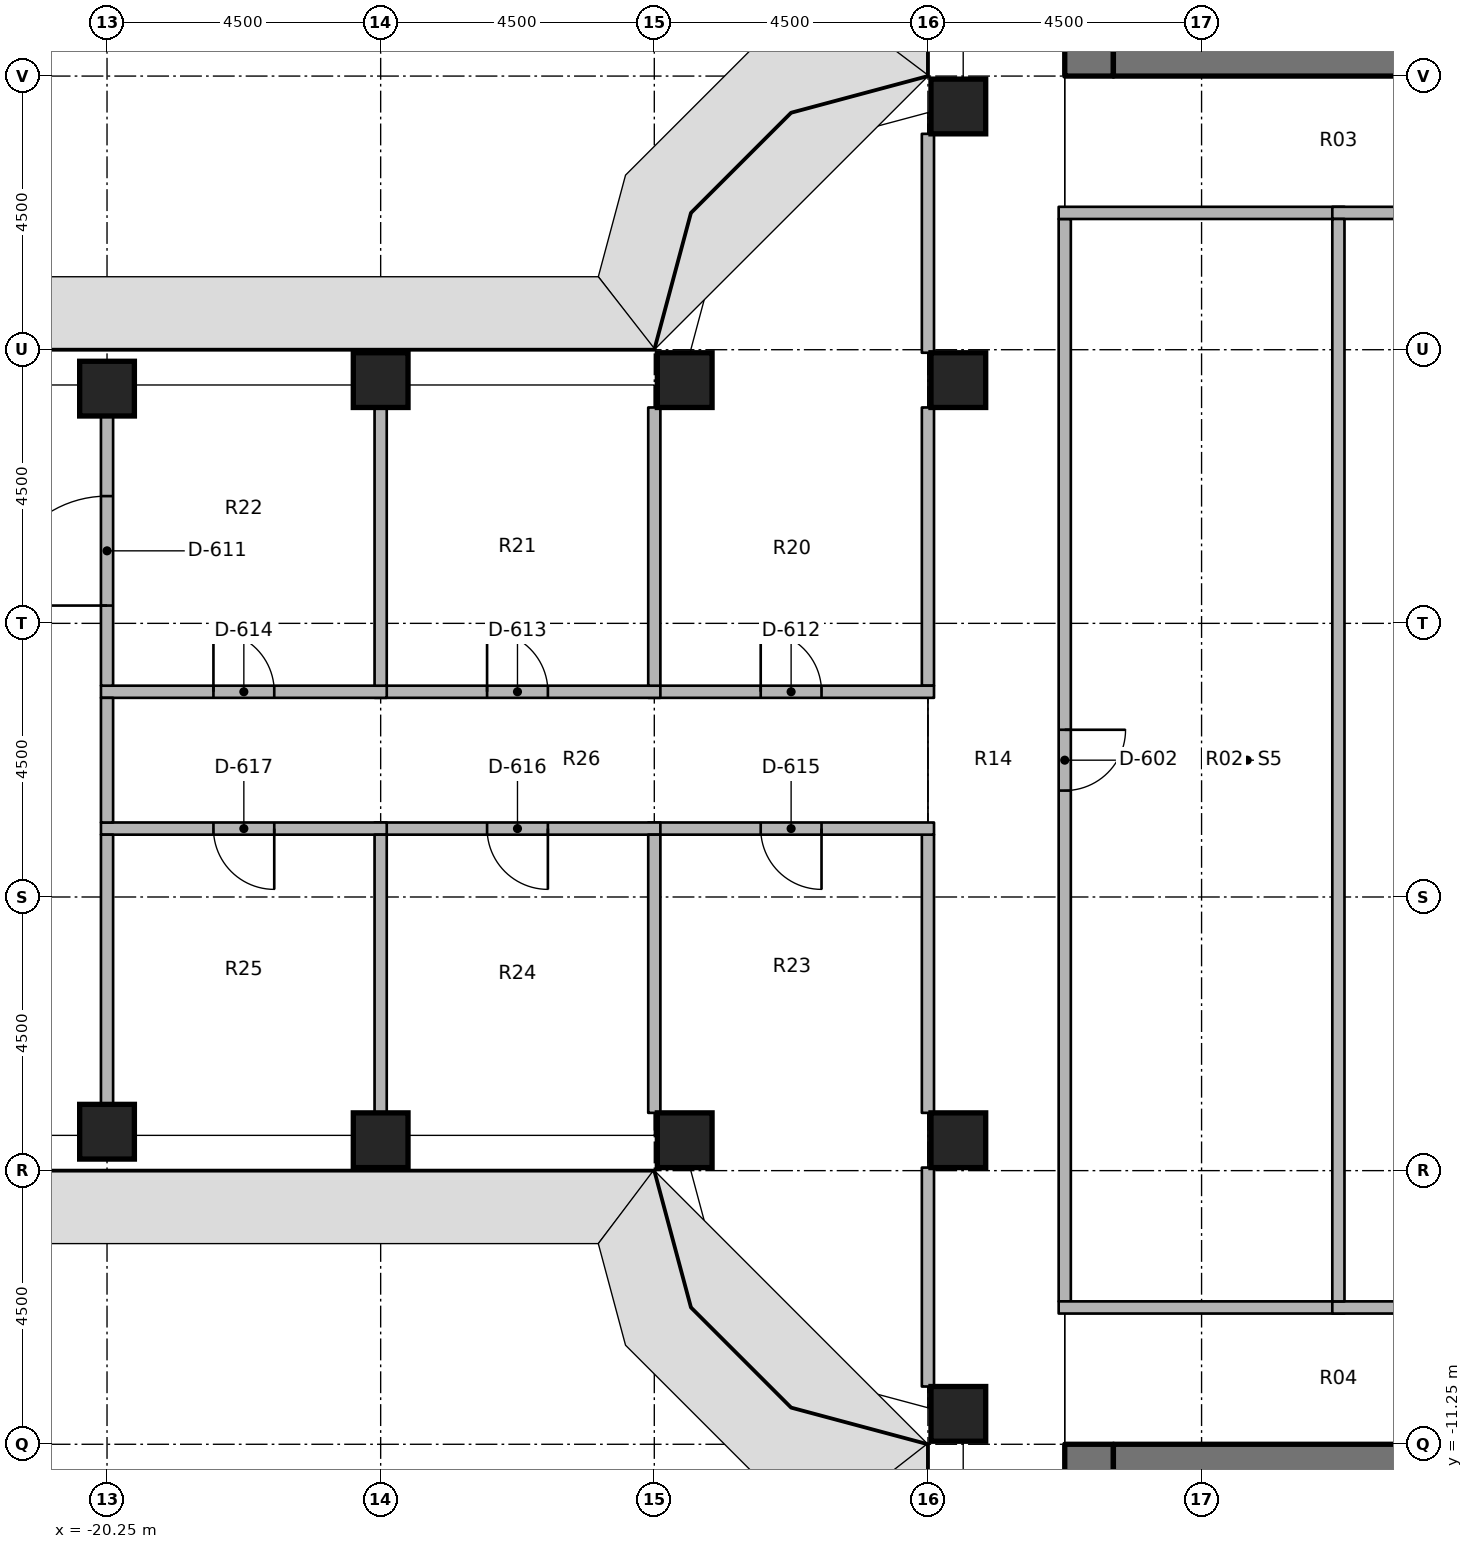
"""IFC4 building model, lengths in metres.
Left out: names, types, materials, properties, quantities, classifications, styles, units other than length and angle.
Written with IfcOpenShell. Run it as: python <this file> out.ifc"""

import sys

from ifc_helpers import new_model, si_unit, direction, frame, frame_2d, origin, origin_2d, place, context, subcontext, project, spatial, rectangle, extrude, element, fill, save


model = new_model("IFC4")
c1 = context("Model", 3, precision=1e-05, world=origin(), true_north=direction((0.0, 1.0)))
c2 = subcontext(c1, "Body", "Model", "MODEL_VIEW")
j1 = project(units=[si_unit("LENGTHUNIT", "METRE"), si_unit("PLANEANGLEUNIT", "RADIAN")], contexts=[c1])
p1 = place(None, origin())
s1 = spatial("IfcSite", under=j1, at=p1, CompositionType="ELEMENT")
p2 = place(p1, origin())
s2 = spatial("IfcBuilding", under=s1, at=p2, CompositionType="ELEMENT")
p3 = place(p2, frame((0.0, 0.0, 86.6)))
s3 = spatial("IfcBuildingStorey", under=s2, at=p3, CompositionType="ELEMENT", Elevation=86.6)
for number, where, z_axis, x_axis in (
    (1, (-20.25, -6.11, 0.0), (0.0, 0.0, 1.0), (1.0, 0.0, 0.0)),
    (2, (-20.25, 6.11, 0.0), (0.0, 0.0, 1.0), (1.0, 0.0, 0.0)),
    (3, (-15.75, -6.25, 0.0), (0.0, 0.0, 1.0), (1.0, 0.0, 0.0)),
    (4, (-15.75, 6.25, 0.0), (0.0, 0.0, 1.0), (1.0, 0.0, 0.0)),
    (5, (-10.75, -6.25, 0.0), (0.0, 0.0, 1.0), (1.0, 0.0, 0.0)),
    (6, (-10.75, 6.25, 0.0), (0.0, 0.0, 1.0), (1.0, 0.0, 0.0)),
    (7, (-6.25, -10.75, 0.0), (0.0, 0.0, 1.0), (1.0, 0.0, 0.0)),
    (8, (-6.25, -6.25, 0.0), (0.0, 0.0, 1.0), (1.0, 0.0, 0.0)),
    (9, (-6.25, 6.25, 0.0), (0.0, 0.0, 1.0), (1.0, 0.0, 0.0)),
    (10, (-6.25, 10.75, 0.0), (0.0, 0.0, 1.0), (1.0, 0.0, 0.0)),
):
    element("IfcColumn", number, at=place(p3, frame(where, z_axis=z_axis, x_axis=x_axis)), inside=s3, PredefinedType="COLUMN", context=c2, shape_type="SweptSolid", body=[
        extrude(rectangle(XDim=0.9, YDim=0.9, at=origin_2d()), origin(), (0.0, 0.0, 1.0), 3.65),
    ])
p4 = place(p3, frame((-4.1, 11.25, 0.0), z_axis=(0.0, 0.0, 1.0), x_axis=(0.0, 1.0, 0.0)))
e11 = element("IfcWall", 11, at=p4, inside=s3, PredefinedType="SHEAR", context=c2, shape_type="SweptSolid", body=[
    extrude(rectangle(XDim=15.0, YDim=0.8, at=frame_2d((7.5, 0.0))), origin(), (0.0, 0.0, 1.0), 3.8),
])
p5 = place(p4, frame((7.15, 0.0, 0.0)))
e12 = element("IfcOpeningElement", 12, at=p5, cuts=e11, PredefinedType="OPENING", context=c2, shape_type="SweptSolid", body=[
    extrude(rectangle(XDim=1.5, YDim=2.3, at=frame_2d((0.75, 1.15))), frame((0.0, 0.41, 0.0), z_axis=(0.0, -1.0, 0.0), x_axis=(1.0, 0.0, 0.0)), (0.0, 0.0, 1.0), 0.82),
])
p6 = place(p4, frame((13.9, 0.0, 0.0)))
e13 = element("IfcOpeningElement", 13, at=p6, cuts=e11, PredefinedType="OPENING", context=c2, shape_type="SweptSolid", body=[
    extrude(rectangle(XDim=0.9, YDim=2.1, at=frame_2d((0.45, 1.05))), frame((0.0, 0.41, 0.0), z_axis=(0.0, -1.0, 0.0), x_axis=(1.0, 0.0, 0.0)), (0.0, 0.0, 1.0), 0.82),
])
p7 = place(p4, frame((1.15, 0.0, 0.0)))
e14 = element("IfcOpeningElement", 14, at=p7, cuts=e11, PredefinedType="OPENING", context=c2, shape_type="SweptSolid", body=[
    extrude(rectangle(XDim=1.2, YDim=2.1, at=frame_2d((0.6, 1.05))), frame((0.0, 0.41, 0.0), z_axis=(0.0, -1.0, 0.0), x_axis=(1.0, 0.0, 0.0)), (0.0, 0.0, 1.0), 0.82),
])
p8 = place(p3, frame((-3.7, 11.65, 0.0), z_axis=(0.0, 0.0, 1.0), x_axis=(1.0, 0.0, 0.0)))
e15 = element("IfcWall", 15, at=p8, inside=s3, PredefinedType="SHEAR", context=c2, shape_type="SweptSolid", body=[
    extrude(rectangle(XDim=7.4, YDim=0.8, at=frame_2d((3.7, 0.0))), origin(), (0.0, 0.0, 1.0), 3.8),
])
p9 = place(p3, frame((-4.1, -11.25, 0.0), z_axis=(0.0, 0.0, 1.0), x_axis=(0.0, -1.0, 0.0)))
e16 = element("IfcWall", 16, at=p9, inside=s3, PredefinedType="SHEAR", context=c2, shape_type="SweptSolid", body=[
    extrude(rectangle(XDim=15.0, YDim=0.8, at=frame_2d((7.5, 0.0))), origin(), (0.0, 0.0, 1.0), 3.8),
])
p10 = place(p9, frame((7.15, 0.0, 0.0)))
e17 = element("IfcOpeningElement", 17, at=p10, cuts=e16, PredefinedType="OPENING", context=c2, shape_type="SweptSolid", body=[
    extrude(rectangle(XDim=1.5, YDim=2.3, at=frame_2d((0.75, 1.15))), frame((0.0, 0.41, 0.0), z_axis=(0.0, -1.0, 0.0), x_axis=(1.0, 0.0, 0.0)), (0.0, 0.0, 1.0), 0.82),
])
p11 = place(p9, frame((5.55, 0.0, 0.0)))
e18 = element("IfcOpeningElement", 18, at=p11, cuts=e16, PredefinedType="OPENING", context=c2, shape_type="SweptSolid", body=[
    extrude(rectangle(XDim=1.2, YDim=2.1, at=frame_2d((0.6, 1.05))), frame((0.0, 0.41, 0.0), z_axis=(0.0, -1.0, 0.0), x_axis=(1.0, 0.0, 0.0)), (0.0, 0.0, 1.0), 0.82),
])
p12 = place(p3, frame((-3.7, -11.65, 0.0), z_axis=(0.0, 0.0, 1.0), x_axis=(1.0, 0.0, 0.0)))
e19 = element("IfcWall", 19, at=p12, inside=s3, PredefinedType="SHEAR", context=c2, shape_type="SweptSolid", body=[
    extrude(rectangle(XDim=7.4, YDim=0.8, at=frame_2d((3.7, 0.0))), origin(), (0.0, 0.0, 1.0), 3.8),
])
p13 = place(p3, frame((-4.5, 8.9, 0.0), z_axis=(0.0, 0.0, 1.0), x_axis=(0.0, -1.0, 0.0)))
e20 = element("IfcWall", 20, at=p13, inside=s3, PredefinedType="PARTITIONING", context=c2, shape_type="SweptSolid", body=[
    extrude(rectangle(XDim=17.8, YDim=0.2, at=frame_2d((8.9, 0.0))), origin(), (0.0, 0.0, 1.0), 2.738),
])
p14 = place(p13, frame((8.4, 0.0, 0.0)))
e21 = element("IfcOpeningElement", 21, at=p14, cuts=e20, PredefinedType="OPENING", context=c2, shape_type="SweptSolid", body=[
    extrude(rectangle(XDim=1.0, YDim=2.1, at=frame_2d((0.5, 1.05))), frame((0.0, 0.11, 0.0), z_axis=(0.0, -1.0, 0.0), x_axis=(1.0, 0.0, 0.0)), (0.0, 0.0, 1.0), 0.22),
])
p15 = place(p3, frame((-6.75, 1.225, 0.0), z_axis=(0.0, 0.0, 1.0), x_axis=(0.0, 1.0, 0.0)))
e22 = element("IfcWall", 22, at=p15, inside=s3, PredefinedType="PARTITIONING", context=c2, shape_type="SweptSolid", body=[
    extrude(rectangle(XDim=4.575, YDim=0.2, at=frame_2d((2.288, 0.0))), origin(), (0.0, 0.0, 1.0), 2.738),
])
for number, where, z_axis, x_axis in (
    (23, (-6.75, 6.7, 0.0), (0.0, 0.0, 1.0), (0.0, 1.0, 0.0)),
    (24, (-6.75, -10.3, 0.0), (0.0, 0.0, 1.0), (0.0, 1.0, 0.0)),
):
    element("IfcWall", number, at=place(p3, frame(where, z_axis=z_axis, x_axis=x_axis)), inside=s3, PredefinedType="PARTITIONING", context=c2, shape_type="SweptSolid", body=[
        extrude(rectangle(XDim=3.6, YDim=0.2, at=frame_2d((1.8, 0.0))), origin(), (0.0, 0.0, 1.0), 2.738),
    ])
p16 = place(p3, frame((-6.75, -5.8, 0.0), z_axis=(0.0, 0.0, 1.0), x_axis=(0.0, 1.0, 0.0)))
e25 = element("IfcWall", 25, at=p16, inside=s3, PredefinedType="PARTITIONING", context=c2, shape_type="SweptSolid", body=[
    extrude(rectangle(XDim=4.575, YDim=0.2, at=frame_2d((2.288, 0.0))), origin(), (0.0, 0.0, 1.0), 2.738),
])
for number, where, z_axis, x_axis in (
    (26, (-4.6, 9.0, 0.0), (0.0, 0.0, 1.0), (1.0, 0.0, 0.0)),
    (27, (-0.1, 9.0, 0.0), (0.0, 0.0, 1.0), (1.0, 0.0, 0.0)),
    (28, (-4.6, -9.0, 0.0), (0.0, 0.0, 1.0), (1.0, 0.0, 0.0)),
    (29, (-0.1, -9.0, 0.0), (0.0, 0.0, 1.0), (1.0, 0.0, 0.0)),
):
    element("IfcWall", number, at=place(p3, frame(where, z_axis=z_axis, x_axis=x_axis)), inside=s3, PredefinedType="PARTITIONING", context=c2, shape_type="SweptSolid", body=[
        extrude(rectangle(XDim=4.7, YDim=0.2, at=frame_2d((2.35, 0.0))), origin(), (0.0, 0.0, 1.0), 2.738),
    ])
p17 = place(p3, frame((0.0, -8.9, 0.0), z_axis=(0.0, 0.0, 1.0), x_axis=(0.0, 1.0, 0.0)))
e30 = element("IfcWall", 30, at=p17, inside=s3, PredefinedType="PARTITIONING", context=c2, shape_type="SweptSolid", body=[
    extrude(rectangle(XDim=17.8, YDim=0.2, at=frame_2d((8.9, 0.0))), origin(), (0.0, 0.0, 1.0), 2.738),
])
p18 = place(p3, frame((-11.35, 1.125, 0.0), z_axis=(0.0, 0.0, 1.0), x_axis=(1.0, 0.0, 0.0)))
e31 = element("IfcWall", 31, at=p18, inside=s3, PredefinedType="PARTITIONING", context=c2, shape_type="SweptSolid", body=[
    extrude(rectangle(XDim=4.7, YDim=0.2, at=frame_2d((2.35, 0.0))), origin(), (0.0, 0.0, 1.0), 2.738),
])
p19 = place(p18, frame((1.85, 0.0, 0.0)))
e32 = element("IfcOpeningElement", 32, at=p19, cuts=e31, PredefinedType="OPENING", context=c2, shape_type="SweptSolid", body=[
    extrude(rectangle(XDim=1.0, YDim=2.1, at=frame_2d((0.5, 1.05))), frame((0.0, 0.11, 0.0), z_axis=(0.0, -1.0, 0.0), x_axis=(1.0, 0.0, 0.0)), (0.0, 0.0, 1.0), 0.22),
])
p20 = place(p3, frame((-6.65, -1.125, 0.0), z_axis=(0.0, 0.0, 1.0), x_axis=(-1.0, 0.0, 0.0)))
e33 = element("IfcWall", 33, at=p20, inside=s3, PredefinedType="PARTITIONING", context=c2, shape_type="SweptSolid", body=[
    extrude(rectangle(XDim=4.7, YDim=0.2, at=frame_2d((2.35, 0.0))), origin(), (0.0, 0.0, 1.0), 2.738),
])
p21 = place(p20, frame((1.85, 0.0, 0.0)))
e34 = element("IfcOpeningElement", 34, at=p21, cuts=e33, PredefinedType="OPENING", context=c2, shape_type="SweptSolid", body=[
    extrude(rectangle(XDim=1.0, YDim=2.1, at=frame_2d((0.5, 1.05))), frame((0.0, 0.11, 0.0), z_axis=(0.0, -1.0, 0.0), x_axis=(1.0, 0.0, 0.0)), (0.0, 0.0, 1.0), 0.22),
])
p22 = place(p3, frame((-15.85, 1.125, 0.0), z_axis=(0.0, 0.0, 1.0), x_axis=(1.0, 0.0, 0.0)))
e35 = element("IfcWall", 35, at=p22, inside=s3, PredefinedType="PARTITIONING", context=c2, shape_type="SweptSolid", body=[
    extrude(rectangle(XDim=4.7, YDim=0.2, at=frame_2d((2.35, 0.0))), origin(), (0.0, 0.0, 1.0), 2.738),
])
p23 = place(p22, frame((1.85, 0.0, 0.0)))
e36 = element("IfcOpeningElement", 36, at=p23, cuts=e35, PredefinedType="OPENING", context=c2, shape_type="SweptSolid", body=[
    extrude(rectangle(XDim=1.0, YDim=2.1, at=frame_2d((0.5, 1.05))), frame((0.0, 0.11, 0.0), z_axis=(0.0, -1.0, 0.0), x_axis=(1.0, 0.0, 0.0)), (0.0, 0.0, 1.0), 0.22),
])
p24 = place(p3, frame((-20.35, 1.125, 0.0), z_axis=(0.0, 0.0, 1.0), x_axis=(1.0, 0.0, 0.0)))
e37 = element("IfcWall", 37, at=p24, inside=s3, PredefinedType="PARTITIONING", context=c2, shape_type="SweptSolid", body=[
    extrude(rectangle(XDim=4.7, YDim=0.2, at=frame_2d((2.35, 0.0))), origin(), (0.0, 0.0, 1.0), 2.738),
])
p25 = place(p24, frame((1.85, 0.0, 0.0)))
e38 = element("IfcOpeningElement", 38, at=p25, cuts=e37, PredefinedType="OPENING", context=c2, shape_type="SweptSolid", body=[
    extrude(rectangle(XDim=1.0, YDim=2.1, at=frame_2d((0.5, 1.05))), frame((0.0, 0.11, 0.0), z_axis=(0.0, -1.0, 0.0), x_axis=(1.0, 0.0, 0.0)), (0.0, 0.0, 1.0), 0.22),
])
p26 = place(p3, frame((-11.15, -1.125, 0.0), z_axis=(0.0, 0.0, 1.0), x_axis=(-1.0, 0.0, 0.0)))
e39 = element("IfcWall", 39, at=p26, inside=s3, PredefinedType="PARTITIONING", context=c2, shape_type="SweptSolid", body=[
    extrude(rectangle(XDim=4.7, YDim=0.2, at=frame_2d((2.35, 0.0))), origin(), (0.0, 0.0, 1.0), 2.738),
])
p27 = place(p26, frame((1.85, 0.0, 0.0)))
e40 = element("IfcOpeningElement", 40, at=p27, cuts=e39, PredefinedType="OPENING", context=c2, shape_type="SweptSolid", body=[
    extrude(rectangle(XDim=1.0, YDim=2.1, at=frame_2d((0.5, 1.05))), frame((0.0, 0.11, 0.0), z_axis=(0.0, -1.0, 0.0), x_axis=(1.0, 0.0, 0.0)), (0.0, 0.0, 1.0), 0.22),
])
p28 = place(p3, frame((-15.65, -1.125, 0.0), z_axis=(0.0, 0.0, 1.0), x_axis=(-1.0, 0.0, 0.0)))
e41 = element("IfcWall", 41, at=p28, inside=s3, PredefinedType="PARTITIONING", context=c2, shape_type="SweptSolid", body=[
    extrude(rectangle(XDim=4.7, YDim=0.2, at=frame_2d((2.35, 0.0))), origin(), (0.0, 0.0, 1.0), 2.738),
])
p29 = place(p28, frame((1.85, 0.0, 0.0)))
e42 = element("IfcOpeningElement", 42, at=p29, cuts=e41, PredefinedType="OPENING", context=c2, shape_type="SweptSolid", body=[
    extrude(rectangle(XDim=1.0, YDim=2.1, at=frame_2d((0.5, 1.05))), frame((0.0, 0.11, 0.0), z_axis=(0.0, -1.0, 0.0), x_axis=(1.0, 0.0, 0.0)), (0.0, 0.0, 1.0), 0.22),
])
p30 = place(p3, frame((-20.25, -1.025, 0.0), z_axis=(0.0, 0.0, 1.0), x_axis=(0.0, 1.0, 0.0)))
e43 = element("IfcWall", 43, at=p30, inside=s3, PredefinedType="PARTITIONING", context=c2, shape_type="SweptSolid", body=[
    extrude(rectangle(XDim=2.05, YDim=0.2, at=frame_2d((1.025, 0.0))), origin(), (0.0, 0.0, 1.0), 2.738),
])
for number, where, z_axis, x_axis in (
    (44, (-11.25, 1.225, 0.0), (0.0, 0.0, 1.0), (0.0, 1.0, 0.0)),
    (45, (-11.25, -5.8, 0.0), (0.0, 0.0, 1.0), (0.0, 1.0, 0.0)),
    (46, (-15.75, 1.225, 0.0), (0.0, 0.0, 1.0), (0.0, 1.0, 0.0)),
):
    element("IfcWall", number, at=place(p3, frame(where, z_axis=z_axis, x_axis=x_axis)), inside=s3, PredefinedType="PARTITIONING", context=c2, shape_type="SweptSolid", body=[
        extrude(rectangle(XDim=4.575, YDim=0.2, at=frame_2d((2.288, 0.0))), origin(), (0.0, 0.0, 1.0), 2.738),
    ])
p31 = place(p3, frame((-20.25, 1.225, 0.0), z_axis=(0.0, 0.0, 1.0), x_axis=(0.0, 1.0, 0.0)))
e47 = element("IfcWall", 47, at=p31, inside=s3, PredefinedType="PARTITIONING", context=c2, shape_type="SweptSolid", body=[
    extrude(rectangle(XDim=4.435, YDim=0.2, at=frame_2d((2.217, 0.0))), origin(), (0.0, 0.0, 1.0), 2.738),
])
p32 = place(p31, frame((1.317, 0.0, 0.0)))
e48 = element("IfcOpeningElement", 48, at=p32, cuts=e47, PredefinedType="OPENING", context=c2, shape_type="SweptSolid", body=[
    extrude(rectangle(XDim=1.8, YDim=2.1, at=frame_2d((0.9, 1.05))), frame((0.0, 0.11, 0.0), z_axis=(0.0, -1.0, 0.0), x_axis=(1.0, 0.0, 0.0)), (0.0, 0.0, 1.0), 0.22),
])
p33 = place(p3, frame((-15.75, -5.8, 0.0), z_axis=(0.0, 0.0, 1.0), x_axis=(0.0, 1.0, 0.0)))
e49 = element("IfcWall", 49, at=p33, inside=s3, PredefinedType="PARTITIONING", context=c2, shape_type="SweptSolid", body=[
    extrude(rectangle(XDim=4.575, YDim=0.2, at=frame_2d((2.288, 0.0))), origin(), (0.0, 0.0, 1.0), 2.738),
])
p34 = place(p3, frame((-20.25, -5.66, 0.0), z_axis=(0.0, 0.0, 1.0), x_axis=(0.0, 1.0, 0.0)))
e50 = element("IfcWall", 50, at=p34, inside=s3, PredefinedType="PARTITIONING", context=c2, shape_type="SweptSolid", body=[
    extrude(rectangle(XDim=4.435, YDim=0.2, at=frame_2d((2.217, 0.0))), origin(), (0.0, 0.0, 1.0), 2.738),
])
p35 = place(p14, origin())
e51 = element("IfcDoor", 51, at=p35, inside=s3, OperationType="SINGLE_SWING_RIGHT", PredefinedType="DOOR", context=c2, shape_type="SweptSolid", body=[
    extrude(rectangle(XDim=1.0, YDim=2.1, at=frame_2d((0.5, 1.05))), frame((0.0, 0.025, 0.0), z_axis=(0.0, -1.0, 0.0), x_axis=(1.0, 0.0, 0.0)), (0.0, 0.0, 1.0), 0.05),
])
fill(e21, e51)
p36 = place(p32, origin())
e52 = element("IfcDoor", 52, at=p36, inside=s3, OperationType="DOUBLE_DOOR_SINGLE_SWING", PredefinedType="DOOR", context=c2, shape_type="SweptSolid", body=[
    extrude(rectangle(XDim=1.8, YDim=2.1, at=frame_2d((0.9, 1.05))), frame((0.0, 0.025, 0.0), z_axis=(0.0, -1.0, 0.0), x_axis=(1.0, 0.0, 0.0)), (0.0, 0.0, 1.0), 0.05),
])
fill(e48, e52)
p37 = place(p19, origin())
e53 = element("IfcDoor", 53, at=p37, inside=s3, OperationType="SINGLE_SWING_RIGHT", PredefinedType="DOOR", context=c2, shape_type="SweptSolid", body=[
    extrude(rectangle(XDim=1.0, YDim=2.1, at=frame_2d((0.5, 1.05))), frame((0.0, 0.025, 0.0), z_axis=(0.0, -1.0, 0.0), x_axis=(1.0, 0.0, 0.0)), (0.0, 0.0, 1.0), 0.05),
])
fill(e32, e53)
p38 = place(p23, origin())
e54 = element("IfcDoor", 54, at=p38, inside=s3, OperationType="SINGLE_SWING_RIGHT", PredefinedType="DOOR", context=c2, shape_type="SweptSolid", body=[
    extrude(rectangle(XDim=1.0, YDim=2.1, at=frame_2d((0.5, 1.05))), frame((0.0, 0.025, 0.0), z_axis=(0.0, -1.0, 0.0), x_axis=(1.0, 0.0, 0.0)), (0.0, 0.0, 1.0), 0.05),
])
fill(e36, e54)
p39 = place(p25, origin())
e55 = element("IfcDoor", 55, at=p39, inside=s3, OperationType="SINGLE_SWING_RIGHT", PredefinedType="DOOR", context=c2, shape_type="SweptSolid", body=[
    extrude(rectangle(XDim=1.0, YDim=2.1, at=frame_2d((0.5, 1.05))), frame((0.0, 0.025, 0.0), z_axis=(0.0, -1.0, 0.0), x_axis=(1.0, 0.0, 0.0)), (0.0, 0.0, 1.0), 0.05),
])
fill(e38, e55)
p40 = place(p21, origin())
e56 = element("IfcDoor", 56, at=p40, inside=s3, OperationType="SINGLE_SWING_RIGHT", PredefinedType="DOOR", context=c2, shape_type="SweptSolid", body=[
    extrude(rectangle(XDim=1.0, YDim=2.1, at=frame_2d((0.5, 1.05))), frame((0.0, 0.025, 0.0), z_axis=(0.0, -1.0, 0.0), x_axis=(1.0, 0.0, 0.0)), (0.0, 0.0, 1.0), 0.05),
])
fill(e34, e56)
p41 = place(p27, origin())
e57 = element("IfcDoor", 57, at=p41, inside=s3, OperationType="SINGLE_SWING_RIGHT", PredefinedType="DOOR", context=c2, shape_type="SweptSolid", body=[
    extrude(rectangle(XDim=1.0, YDim=2.1, at=frame_2d((0.5, 1.05))), frame((0.0, 0.025, 0.0), z_axis=(0.0, -1.0, 0.0), x_axis=(1.0, 0.0, 0.0)), (0.0, 0.0, 1.0), 0.05),
])
fill(e40, e57)
p42 = place(p29, origin())
e58 = element("IfcDoor", 58, at=p42, inside=s3, OperationType="SINGLE_SWING_LEFT", PredefinedType="DOOR", context=c2, shape_type="SweptSolid", body=[
    extrude(rectangle(XDim=1.0, YDim=2.1, at=frame_2d((0.5, 1.05))), frame((0.0, 0.025, 0.0), z_axis=(0.0, -1.0, 0.0), x_axis=(1.0, 0.0, 0.0)), (0.0, 0.0, 1.0), 0.05),
])
fill(e42, e58)
save(model, sys.argv[1])
